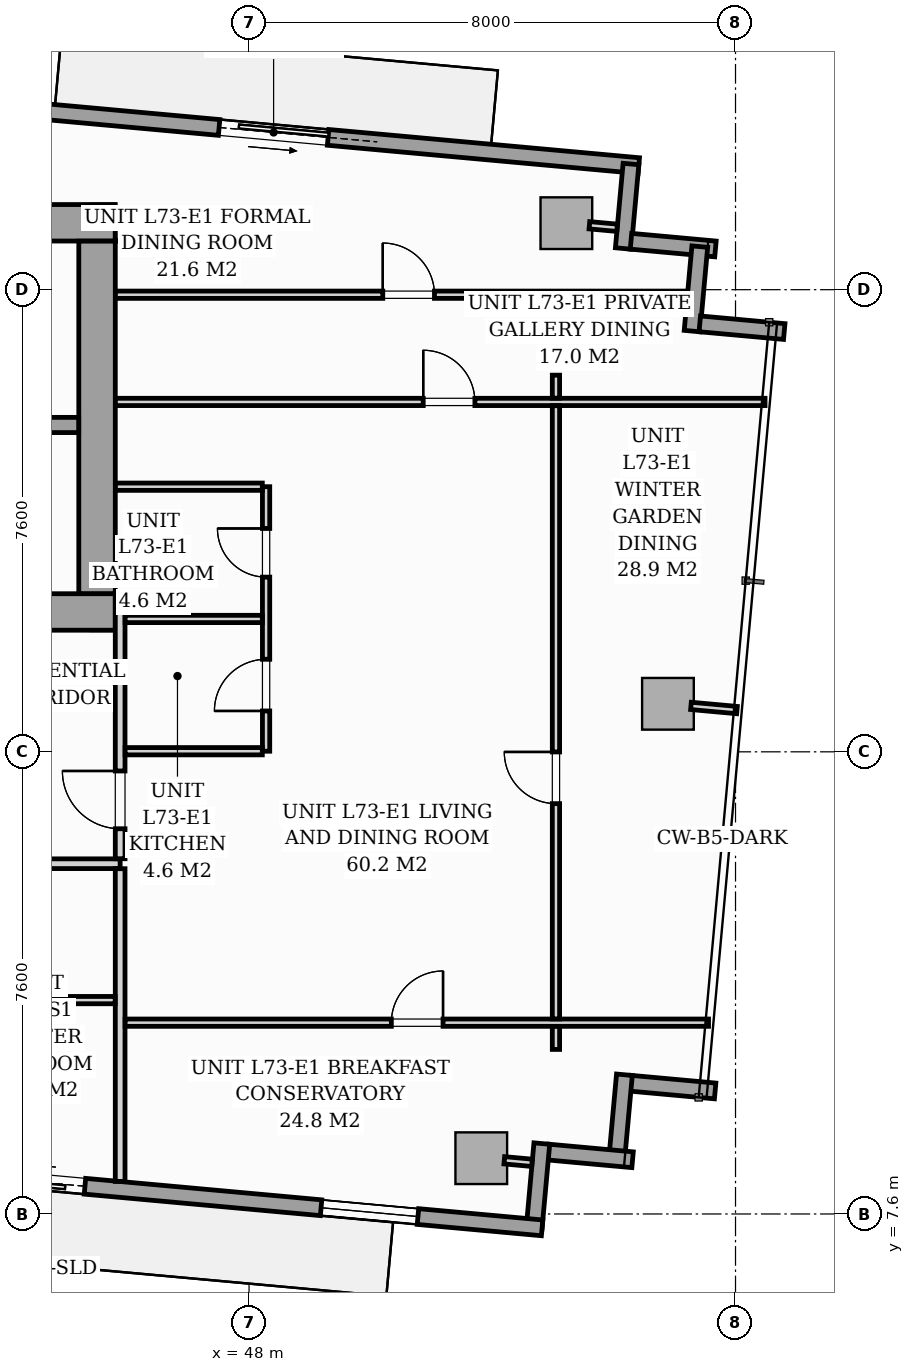
"""IFC4 building model, lengths in metres.
Left out: names, types, materials, properties, quantities, classifications, styles, units other than length and angle.
Written with IfcOpenShell. Run it as: python <this file> out.ifc"""

import sys

from ifc_helpers import new_model, si_unit, direction, frame, frame_2d, origin, origin_2d, place, context, subcontext, project, spatial, rectangle, i_section, extrude, source, transform, mapped, element, fill, save


model = new_model("IFC4")
c1 = context("Model", 3, precision=1e-05, world=origin(), true_north=direction((0.0, 1.0)))
c2 = subcontext(c1, "Body", "Model", "MODEL_VIEW")
j1 = project(units=[si_unit("LENGTHUNIT", "METRE"), si_unit("PLANEANGLEUNIT", "RADIAN")], contexts=[c1])
p1 = place(None, origin())
s1 = spatial("IfcSite", under=j1, at=p1, CompositionType="ELEMENT")
p2 = place(p1, origin())
s2 = spatial("IfcBuilding", under=s1, at=p2, CompositionType="ELEMENT")
p3 = place(p2, frame((0.0, 0.0, 252.9)))
s3 = spatial("IfcBuildingStorey", under=s2, at=p3, CompositionType="ELEMENT", Elevation=252.9)
m1 = source(origin(), c2, "Body", "SweptSolid", [
    extrude(i_section(OverallWidth=0.409, OverallDepth=0.425, WebThickness=0.033, FlangeThickness=0.052, FilletRadius=0.018, at=origin_2d()), origin(), (0.0, 0.0, 1.0), 3.296),
])
for number, where, z_axis, x_axis in (
    (1, (45.6, 17.4, 0.002), (0.0, 0.0, 1.0), (1.0, 0.0, 0.0)),
    (2, (45.6, 24.0, 0.002), (0.0, 0.0, 1.0), (1.0, 0.0, 0.0)),
):
    element("IfcColumn", number, at=place(p3, frame(where, z_axis=z_axis, x_axis=x_axis)), inside=s3, PredefinedType="PILASTER", context=c2, shape_type="MappedRepresentation", body=[
        mapped(m1, transform((0.0, 0.0, 0.0), scale=1.0)),
    ])
m2 = source(origin(), c2, "Body", "SweptSolid", [
    extrude(rectangle(XDim=0.85, YDim=0.85, at=origin_2d()), origin(), (0.0, 0.0, 1.0), 3.296),
])
for number, where, z_axis, x_axis in (
    (3, (51.819, 8.517, 0.002), (0.0, 0.0, 1.0), (0.996, -0.091, 0.0)),
    (4, (53.218, 23.894, 0.002), (0.0, 0.0, 1.0), (0.996, -0.091, 0.0)),
    (5, (54.889, 15.99, 0.002), (0.0, 0.0, 1.0), (0.996, -0.091, 0.0)),
):
    element("IfcColumn", number, at=place(p3, frame(where, z_axis=z_axis, x_axis=x_axis)), inside=s3, PredefinedType="COLUMN", context=c2, shape_type="MappedRepresentation", body=[
        mapped(m2, transform((0.0, 0.0, 0.0), scale=1.0)),
    ])
p4 = place(p3, frame((39.839, 26.166, 0.0), z_axis=(0.0, 0.0, 1.0), x_axis=(0.995884447498, -0.090632043071, 0.0)))
e6 = element("IfcWall", 6, at=p4, inside=s3, PredefinedType="STANDARD", context=c2, shape_type="SweptSolid", body=[
    extrude(rectangle(XDim=14.63, YDim=0.26, at=frame_2d((7.315, 0.0))), origin(), (0.0, 0.0, 1.0), 3.04),
])
p5 = place(p4, frame((7.7, 0.0, 0.0)))
e7 = element("IfcOpeningElement", 7, at=p5, cuts=e6, PredefinedType="OPENING", context=c2, shape_type="SweptSolid", body=[
    extrude(rectangle(XDim=1.8, YDim=2.06, at=frame_2d((0.9, 1.03))), frame((0.0, 0.14, 0.0), z_axis=(0.0, -1.0, 0.0), x_axis=(1.0, 0.0, 0.0)), (0.0, 0.0, 1.0), 0.28),
])
p6 = place(p4, frame((0.7, 0.0, 0.65)))
e8 = element("IfcOpeningElement", 8, at=p6, cuts=e6, PredefinedType="OPENING", context=c2, shape_type="SweptSolid", body=[
    extrude(rectangle(XDim=1.6, YDim=1.5, at=frame_2d((0.8, 0.75))), frame((0.0, 0.14, 0.0), z_axis=(0.0, -1.0, 0.0), x_axis=(1.0, 0.0, 0.0)), (0.0, 0.0, 1.0), 0.28),
])
p7 = place(p3, frame((54.281, 24.866, 0.0), z_axis=(0.0, 0.0, 1.0), x_axis=(-0.090661991521, -0.995881721538, 0.0)))
e9 = element("IfcWall", 9, at=p7, inside=s3, PredefinedType="STANDARD", context=c2, shape_type="SweptSolid", body=[
    extrude(rectangle(XDim=1.395, YDim=0.26, at=frame_2d((0.698, 0.0))), origin(), (0.0, 0.0, 1.0), 3.04),
])
for number, where, z_axis, x_axis in (
    (10, (54.281, 23.596, 0.0), (0.0, 0.0, 1.0), (0.996, -0.091, 0.0)),
    (11, (55.412, 23.508, 0.0), (0.0, 0.0, 1.0), (-0.091, -0.996, 0.0)),
    (12, (55.412, 22.238, 0.0), (0.0, 0.0, 1.0), (0.996, -0.091, 0.0)),
):
    element("IfcWall", number, at=place(p3, frame(where, z_axis=z_axis, x_axis=x_axis)), inside=s3, PredefinedType="STANDARD", context=c2, shape_type="SweptSolid", body=[
        extrude(rectangle(XDim=1.395, YDim=0.26, at=frame_2d((0.698, 0.0))), origin(), (0.0, 0.0, 1.0), 3.04),
    ])
for number, where, z_axis, x_axis in (
    (13, (55.665, 9.623, 0.0), (0.0, 0.0, 1.0), (-0.996, 0.091, 0.0)),
    (14, (54.173, 9.889, 0.0), (0.0, 0.0, 1.0), (-0.091, -0.996, 0.0)),
):
    element("IfcWall", number, at=place(p3, frame(where, z_axis=z_axis, x_axis=x_axis)), inside=s3, PredefinedType="STANDARD", context=c2, shape_type="SweptSolid", body=[
        extrude(rectangle(XDim=1.395, YDim=0.26, at=frame_2d((0.698, 0.0))), origin(), (0.0, 0.0, 1.0), 3.04),
    ])
for number, where, z_axis, x_axis in (
    (15, (54.307, 8.492, 0.0), (0.0, 0.0, 1.0), (-0.996, 0.091, 0.0)),
    (16, (52.815, 8.758, 0.0), (0.0, 0.0, 1.0), (-0.091, -0.996, 0.0)),
):
    element("IfcWall", number, at=place(p3, frame(where, z_axis=z_axis, x_axis=x_axis)), inside=s3, PredefinedType="STANDARD", context=c2, shape_type="SweptSolid", body=[
        extrude(rectangle(XDim=1.395, YDim=0.26, at=frame_2d((0.698, 0.0))), origin(), (0.0, 0.0, 1.0), 3.04),
    ])
p8 = place(p3, frame((52.819, 7.372, 0.0), z_axis=(0.0, 0.0, 1.0), x_axis=(-0.995884447498, 0.090632043071, 0.0)))
e17 = element("IfcWall", 17, at=p8, inside=s3, PredefinedType="STANDARD", context=c2, shape_type="SweptSolid", body=[
    extrude(rectangle(XDim=14.63, YDim=0.26, at=frame_2d((7.315, 0.0))), origin(), (0.0, 0.0, 1.0), 3.04),
])
p9 = place(p8, frame((7.549, 0.0, 0.0)))
e18 = element("IfcOpeningElement", 18, at=p9, cuts=e17, PredefinedType="OPENING", context=c2, shape_type="SweptSolid", body=[
    extrude(rectangle(XDim=1.8, YDim=2.06, at=frame_2d((0.9, 1.03))), frame((0.0, 0.14, 0.0), z_axis=(0.0, -1.0, 0.0), x_axis=(1.0, 0.0, 0.0)), (0.0, 0.0, 1.0), 0.28),
])
p10 = place(p8, frame((2.05, 0.0, 0.65)))
e19 = element("IfcOpeningElement", 19, at=p10, cuts=e17, PredefinedType="OPENING", context=c2, shape_type="SweptSolid", body=[
    extrude(rectangle(XDim=1.6, YDim=1.5, at=frame_2d((0.8, 0.75))), frame((0.0, 0.14, 0.0), z_axis=(0.0, -1.0, 0.0), x_axis=(1.0, 0.0, 0.0)), (0.0, 0.0, 1.0), 0.28),
])
p11 = place(p3, frame((26.2, 17.5, 0.0), z_axis=(0.0, 0.0, 1.0), x_axis=(1.0, 0.0, 0.0)))
e20 = element("IfcWall", 20, at=p11, inside=s3, PredefinedType="SHEAR", context=c2, shape_type="SweptSolid", body=[
    extrude(rectangle(XDim=19.6, YDim=0.6, at=frame_2d((9.8, 0.0))), origin(), (0.0, 0.0, 1.0), 3.3),
])
p12 = place(p11, frame((0.95, 0.0, 0.0)))
e21 = element("IfcOpeningElement", 21, at=p12, cuts=e20, PredefinedType="OPENING", context=c2, shape_type="SweptSolid", body=[
    extrude(rectangle(XDim=0.95, YDim=2.06, at=frame_2d((0.475, 1.03))), frame((0.0, 0.31, 0.0), z_axis=(0.0, -1.0, 0.0), x_axis=(1.0, 0.0, 0.0)), (0.0, 0.0, 1.0), 0.62),
])
p13 = place(p11, frame((9.38, 0.0, 0.0)))
e22 = element("IfcOpeningElement", 22, at=p13, cuts=e20, PredefinedType="OPENING", context=c2, shape_type="SweptSolid", body=[
    extrude(rectangle(XDim=0.85, YDim=2.0, at=frame_2d((0.425, 1.0))), frame((0.0, 0.31, 0.0), z_axis=(0.0, -1.0, 0.0), x_axis=(1.0, 0.0, 0.0)), (0.0, 0.0, 1.0), 0.62),
])
p14 = place(p11, frame((17.55, 0.0, 0.0)))
e23 = element("IfcOpeningElement", 23, at=p14, cuts=e20, PredefinedType="OPENING", context=c2, shape_type="SweptSolid", body=[
    extrude(rectangle(XDim=0.95, YDim=2.06, at=frame_2d((0.475, 1.03))), frame((0.0, 0.31, 0.0), z_axis=(0.0, -1.0, 0.0), x_axis=(1.0, 0.0, 0.0)), (0.0, 0.0, 1.0), 0.62),
])
p15 = place(p3, frame((26.2, 23.9, 0.0), z_axis=(0.0, 0.0, 1.0), x_axis=(1.0, 0.0, 0.0)))
e24 = element("IfcWall", 24, at=p15, inside=s3, PredefinedType="SHEAR", context=c2, shape_type="SweptSolid", body=[
    extrude(rectangle(XDim=19.6, YDim=0.6, at=frame_2d((9.8, 0.0))), origin(), (0.0, 0.0, 1.0), 3.3),
])
p16 = place(p3, frame((45.5, 17.802, 0.0), z_axis=(0.0, 0.0, 1.0), x_axis=(0.0, 1.0, 0.0)))
e25 = element("IfcWall", 25, at=p16, inside=s3, PredefinedType="SHEAR", context=c2, shape_type="SweptSolid", body=[
    extrude(rectangle(XDim=5.796, YDim=0.6, at=frame_2d((2.898, 0.0))), origin(), (0.0, 0.0, 1.0), 3.3),
])
p17 = place(p3, frame((37.05, 20.575, 0.0), z_axis=(0.0, 0.0, 1.0), x_axis=(1.0, 0.0, 0.0)))
e26 = element("IfcWall", 26, at=p17, inside=s3, PredefinedType="SOLIDWALL", context=c2, shape_type="SweptSolid", body=[
    extrude(rectangle(XDim=8.148, YDim=0.25, at=frame_2d((4.074, 0.0))), origin(), (0.0, 0.0, 1.0), 3.3),
])
p18 = place(p17, frame((6.6, 0.0, 0.0)))
e27 = element("IfcOpeningElement", 27, at=p18, cuts=e26, PredefinedType="OPENING", context=c2, shape_type="SweptSolid", body=[
    extrude(rectangle(XDim=0.95, YDim=2.06, at=frame_2d((0.475, 1.03))), frame((0.0, 0.135, 0.0), z_axis=(0.0, -1.0, 0.0), x_axis=(1.0, 0.0, 0.0)), (0.0, 0.0, 1.0), 0.27),
])
p19 = place(p3, frame((24.55, 13.36, 0.0), z_axis=(0.0, 0.0, 1.0), x_axis=(1.0, 0.0, 0.0)))
e28 = element("IfcWall", 28, at=p19, inside=s3, PredefinedType="PARTITIONING", context=c2, shape_type="SweptSolid", body=[
    extrude(rectangle(XDim=21.33, YDim=0.16, at=frame_2d((10.665, 0.0))), origin(), (0.0, 0.0, 1.0), 2.605),
])
p20 = place(p19, frame((5.415, 0.0, 0.0)))
e29 = element("IfcOpeningElement", 29, at=p20, cuts=e28, PredefinedType="OPENING", context=c2, shape_type="SweptSolid", body=[
    extrude(rectangle(XDim=0.95, YDim=2.06, at=frame_2d((0.475, 1.03))), frame((0.0, 0.09, 0.0), z_axis=(0.0, -1.0, 0.0), x_axis=(1.0, 0.0, 0.0)), (0.0, 0.0, 1.0), 0.18),
])
p21 = place(p3, frame((45.88, 8.136, 0.0), z_axis=(0.0, 0.0, 1.0), x_axis=(0.0, 1.0, 0.0)))
e30 = element("IfcWall", 30, at=p21, inside=s3, PredefinedType="PARTITIONING", context=c2, shape_type="SweptSolid", body=[
    extrude(rectangle(XDim=5.142, YDim=0.16, at=frame_2d((2.571, 0.0))), origin(), (0.0, 0.0, 1.0), 3.04),
])
p22 = place(p3, frame((45.88, 13.442, 0.0), z_axis=(0.0, 0.0, 1.0), x_axis=(0.0, 1.0, 0.0)))
e31 = element("IfcWall", 31, at=p22, inside=s3, PredefinedType="PARTITIONING", context=c2, shape_type="SweptSolid", body=[
    extrude(rectangle(XDim=4.36, YDim=0.16, at=frame_2d((2.18, 0.0))), origin(), (0.0, 0.0, 1.0), 3.04),
])
p23 = place(p22, frame((0.493, 0.0, 0.0)))
e32 = element("IfcOpeningElement", 32, at=p23, cuts=e31, PredefinedType="OPENING", context=c2, shape_type="SweptSolid", body=[
    extrude(rectangle(XDim=0.95, YDim=2.06, at=frame_2d((0.475, 1.03))), frame((0.0, 0.09, 0.0), z_axis=(0.0, -1.0, 0.0), x_axis=(1.0, 0.0, 0.0)), (0.0, 0.0, 1.0), 0.18),
])
p24 = place(p3, frame((45.88, 23.598, 0.0), z_axis=(0.0, 0.0, 1.0), x_axis=(0.0, 1.0, 0.0)))
e33 = element("IfcWall", 33, at=p24, inside=s3, PredefinedType="PARTITIONING", context=c2, shape_type="SweptSolid", body=[
    extrude(rectangle(XDim=0.452, YDim=0.16, at=frame_2d((0.226, 0.0))), origin(), (0.0, 0.0, 1.0), 3.04),
])
p25 = place(p3, frame((40.262, 11.117, 0.0), z_axis=(0.0, 0.0, 1.0), x_axis=(1.0, 0.0, 0.0)))
e34 = element("IfcWall", 34, at=p25, inside=s3, PredefinedType="PARTITIONING", context=c2, shape_type="SweptSolid", body=[
    extrude(rectangle(XDim=5.536, YDim=0.12, at=frame_2d((2.768, 0.0))), origin(), (0.0, 0.0, 1.0), 3.04),
])
p26 = place(p25, frame((2.528, 0.0, 0.0)))
e35 = element("IfcOpeningElement", 35, at=p26, cuts=e34, PredefinedType="OPENING", context=c2, shape_type="SweptSolid", body=[
    extrude(rectangle(XDim=0.8, YDim=2.02, at=frame_2d((0.4, 1.01))), frame((0.0, 0.07, 0.0), z_axis=(0.0, -1.0, 0.0), x_axis=(1.0, 0.0, 0.0)), (0.0, 0.0, 1.0), 0.14),
])
p27 = place(p3, frame((48.28, 15.21, 0.0), z_axis=(0.0, 0.0, 1.0), x_axis=(0.0, 1.0, 0.0)))
e36 = element("IfcWall", 36, at=p27, inside=s3, PredefinedType="PARTITIONING", context=c2, shape_type="SweptSolid", body=[
    extrude(rectangle(XDim=4.35, YDim=0.12, at=frame_2d((2.175, 0.0))), origin(), (0.0, 0.0, 1.0), 3.04),
])
p28 = place(p27, frame((0.662, 0.0, 0.0)))
e37 = element("IfcOpeningElement", 37, at=p28, cuts=e36, PredefinedType="OPENING", context=c2, shape_type="SweptSolid", body=[
    extrude(rectangle(XDim=0.85, YDim=2.05, at=frame_2d((0.425, 1.025))), frame((0.0, 0.07, 0.0), z_axis=(0.0, -1.0, 0.0), x_axis=(1.0, 0.0, 0.0)), (0.0, 0.0, 1.0), 0.14),
])
p29 = place(p27, frame((2.863, 0.0, 0.0)))
e38 = element("IfcOpeningElement", 38, at=p29, cuts=e36, PredefinedType="OPENING", context=c2, shape_type="SweptSolid", body=[
    extrude(rectangle(XDim=0.8, YDim=2.02, at=frame_2d((0.4, 1.01))), frame((0.0, 0.07, 0.0), z_axis=(0.0, -1.0, 0.0), x_axis=(1.0, 0.0, 0.0)), (0.0, 0.0, 1.0), 0.14),
])
p30 = place(p3, frame((45.962, 17.385, 0.0), z_axis=(0.0, 0.0, 1.0), x_axis=(1.0, 0.0, 0.0)))
e39 = element("IfcWall", 39, at=p30, inside=s3, PredefinedType="PARTITIONING", context=c2, shape_type="SweptSolid", body=[
    extrude(rectangle(XDim=2.256, YDim=0.12, at=frame_2d((1.128, 0.0))), origin(), (0.0, 0.0, 1.0), 2.382),
])
p31 = place(p3, frame((45.962, 15.21, 0.0), z_axis=(0.0, 0.0, 1.0), x_axis=(1.0, 0.0, 0.0)))
e40 = element("IfcWall", 40, at=p31, inside=s3, PredefinedType="PARTITIONING", context=c2, shape_type="SweptSolid", body=[
    extrude(rectangle(XDim=2.256, YDim=0.12, at=frame_2d((1.128, 0.0))), origin(), (0.0, 0.0, 1.0), 3.04),
])
p32 = place(p3, frame((45.802, 19.56, 0.0), z_axis=(0.0, 0.0, 1.0), x_axis=(1.0, 0.0, 0.0)))
e41 = element("IfcWall", 41, at=p32, inside=s3, PredefinedType="PARTITIONING", context=c2, shape_type="SweptSolid", body=[
    extrude(rectangle(XDim=2.416, YDim=0.12, at=frame_2d((1.208, 0.0))), origin(), (0.0, 0.0, 1.0), 3.04),
])
p33 = place(p3, frame((45.802, 22.717, 0.0), z_axis=(0.0, 0.0, 1.0), x_axis=(1.0, 0.0, 0.0)))
e42 = element("IfcWall", 42, at=p33, inside=s3, PredefinedType="PARTITIONING", context=c2, shape_type="SweptSolid", body=[
    extrude(rectangle(XDim=9.406, YDim=0.12, at=frame_2d((4.703, 0.0))), origin(), (0.0, 0.0, 1.0), 3.04),
])
p34 = place(p33, frame((4.397, 0.0, 0.0)))
e43 = element("IfcOpeningElement", 43, at=p34, cuts=e42, PredefinedType="OPENING", context=c2, shape_type="SweptSolid", body=[
    extrude(rectangle(XDim=0.85, YDim=2.05, at=frame_2d((0.425, 1.025))), frame((0.0, 0.07, 0.0), z_axis=(0.0, -1.0, 0.0), x_axis=(1.0, 0.0, 0.0)), (0.0, 0.0, 1.0), 0.14),
])
p35 = place(p3, frame((45.962, 10.746, 0.0), z_axis=(0.0, 0.0, 1.0), x_axis=(1.0, 0.0, 0.0)))
e44 = element("IfcWall", 44, at=p35, inside=s3, PredefinedType="PARTITIONING", context=c2, shape_type="SweptSolid", body=[
    extrude(rectangle(XDim=9.594, YDim=0.12, at=frame_2d((4.797, 0.0))), origin(), (0.0, 0.0, 1.0), 3.04),
])
p36 = place(p35, frame((4.378, 0.0, 0.0)))
e45 = element("IfcOpeningElement", 45, at=p36, cuts=e44, PredefinedType="OPENING", context=c2, shape_type="SweptSolid", body=[
    extrude(rectangle(XDim=0.85, YDim=2.05, at=frame_2d((0.425, 1.025))), frame((0.0, 0.07, 0.0), z_axis=(0.0, -1.0, 0.0), x_axis=(1.0, 0.0, 0.0)), (0.0, 0.0, 1.0), 0.14),
])
p37 = place(p3, frame((45.802, 20.954, 0.0), z_axis=(0.0, 0.0, 1.0), x_axis=(1.0, 0.0, 0.0)))
e46 = element("IfcWall", 46, at=p37, inside=s3, PredefinedType="PARTITIONING", context=c2, shape_type="SweptSolid", body=[
    extrude(rectangle(XDim=10.683, YDim=0.12, at=frame_2d((5.342, 0.0))), origin(), (0.0, 0.0, 1.0), 3.04),
])
p38 = place(p37, frame((5.062, 0.0, 0.0)))
e47 = element("IfcOpeningElement", 47, at=p38, cuts=e46, PredefinedType="OPENING", context=c2, shape_type="SweptSolid", body=[
    extrude(rectangle(XDim=0.85, YDim=2.05, at=frame_2d((0.425, 1.025))), frame((0.0, 0.07, 0.0), z_axis=(0.0, -1.0, 0.0), x_axis=(1.0, 0.0, 0.0)), (0.0, 0.0, 1.0), 0.14),
])
p39 = place(p3, frame((53.047, 10.306, 0.0), z_axis=(0.0, 0.0, 1.0), x_axis=(0.0, 1.0, 0.0)))
e48 = element("IfcWall", 48, at=p39, inside=s3, PredefinedType="PARTITIONING", context=c2, shape_type="SweptSolid", body=[
    extrude(rectangle(XDim=0.378, YDim=0.12, at=frame_2d((0.189, 0.0))), origin(), (0.0, 0.0, 1.0), 3.04),
])
p40 = place(p3, frame((53.047, 10.808, 0.0), z_axis=(0.0, 0.0, 1.0), x_axis=(0.0, 1.0, 0.0)))
e49 = element("IfcWall", 49, at=p40, inside=s3, PredefinedType="PARTITIONING", context=c2, shape_type="SweptSolid", body=[
    extrude(rectangle(XDim=10.084, YDim=0.12, at=frame_2d((5.042, 0.0))), origin(), (0.0, 0.0, 1.0), 3.04),
])
p41 = place(p40, frame((3.54, 0.0, 0.0)))
e50 = element("IfcOpeningElement", 50, at=p41, cuts=e49, PredefinedType="OPENING", context=c2, shape_type="SweptSolid", body=[
    extrude(rectangle(XDim=0.85, YDim=2.05, at=frame_2d((0.425, 1.025))), frame((0.0, 0.07, 0.0), z_axis=(0.0, -1.0, 0.0), x_axis=(1.0, 0.0, 0.0)), (0.0, 0.0, 1.0), 0.14),
])
p42 = place(p3, frame((53.047, 21.016, 0.0), z_axis=(0.0, 0.0, 1.0), x_axis=(0.0, 1.0, 0.0)))
e51 = element("IfcWall", 51, at=p42, inside=s3, PredefinedType="PARTITIONING", context=c2, shape_type="SweptSolid", body=[
    extrude(rectangle(XDim=0.378, YDim=0.12, at=frame_2d((0.189, 0.0))), origin(), (0.0, 0.0, 1.0), 3.04),
])
for number, where, z_axis, x_axis in (
    (52, (52.197, 8.483, 0.0), (0.0, 0.0, 1.0), (0.996, -0.091, 0.0)),
    (53, (53.597, 23.859, 0.0), (0.0, 0.0, 1.0), (0.996, -0.091, 0.0)),
):
    element("IfcWall", number, at=place(p3, frame(where, z_axis=z_axis, x_axis=x_axis)), inside=s3, PredefinedType="PARTITIONING", context=c2, shape_type="SweptSolid", body=[
        extrude(rectangle(XDim=0.458, YDim=0.12, at=frame_2d((0.229, 0.0))), origin(), (0.0, 0.0, 1.0), 3.04),
    ])
p43 = place(p3, frame((55.267, 15.955, 0.0), z_axis=(0.0, 0.0, 1.0), x_axis=(0.995887938321, -0.09059367697, 0.0)))
e54 = element("IfcWall", 54, at=p43, inside=s3, PredefinedType="PARTITIONING", context=c2, shape_type="SweptSolid", body=[
    extrude(rectangle(XDim=0.76, YDim=0.12, at=frame_2d((0.38, 0.0))), origin(), (0.0, 0.0, 1.0), 3.04),
])
m3 = source(origin(), c2, "Body", "SweptSolid", [
    extrude(rectangle(XDim=1.8, YDim=2.06, at=frame_2d((0.9, 1.03))), frame((0.0, 0.025, 0.0), z_axis=(0.0, -1.0, 0.0), x_axis=(1.0, 0.0, 0.0)), (0.0, 0.0, 1.0), 0.05),
])
p44 = place(p5, origin())
e55 = element("IfcDoor", 55, at=p44, inside=s3, OperationType="SLIDING_TO_RIGHT", PredefinedType="DOOR", context=c2, shape_type="MappedRepresentation", body=[
    mapped(m3, transform((0.0, 0.0, 0.0), scale=1.0)),
])
fill(e7, e55)
p45 = place(p9, origin())
e56 = element("IfcDoor", 56, at=p45, inside=s3, OperationType="SLIDING_TO_RIGHT", PredefinedType="DOOR", context=c2, shape_type="MappedRepresentation", body=[
    mapped(m3, transform((0.0, 0.0, 0.0), scale=1.0)),
])
fill(e18, e56)
m4 = source(origin(), c2, "Body", "SweptSolid", [
    extrude(rectangle(XDim=1.6, YDim=1.5, at=frame_2d((0.8, 0.75))), frame((0.0, 0.03, 0.0), z_axis=(0.0, -1.0, 0.0), x_axis=(1.0, 0.0, 0.0)), (0.0, 0.0, 1.0), 0.06),
])
p46 = place(p10, origin())
e57 = element("IfcWindow", 57, at=p46, inside=s3, PartitioningType="SINGLE_PANEL", PredefinedType="WINDOW", context=c2, shape_type="MappedRepresentation", body=[
    mapped(m4, transform((0.0, 0.0, 0.0), scale=1.0)),
])
fill(e19, e57)
m5 = source(origin(), c2, "Body", "SweptSolid", [
    extrude(rectangle(XDim=0.95, YDim=2.06, at=frame_2d((0.475, 1.03))), frame((0.0, 0.025, 0.0), z_axis=(0.0, -1.0, 0.0), x_axis=(1.0, 0.0, 0.0)), (0.0, 0.0, 1.0), 0.05),
])
p47 = place(p23, origin())
e58 = element("IfcDoor", 58, at=p47, inside=s3, OperationType="SINGLE_SWING_RIGHT", PredefinedType="DOOR", context=c2, shape_type="MappedRepresentation", body=[
    mapped(m5, transform((0.0, 0.0, 0.0), scale=1.0)),
])
fill(e32, e58)
m6 = source(origin(), c2, "Body", "SweptSolid", [
    extrude(rectangle(XDim=0.85, YDim=2.05, at=frame_2d((0.425, 1.025))), frame((0.0, 0.025, 0.0), z_axis=(0.0, -1.0, 0.0), x_axis=(1.0, 0.0, 0.0)), (0.0, 0.0, 1.0), 0.05),
])
p48 = place(p28, origin())
e59 = element("IfcDoor", 59, at=p48, inside=s3, OperationType="SINGLE_SWING_LEFT", PredefinedType="DOOR", context=c2, shape_type="MappedRepresentation", body=[
    mapped(m6, transform((0.0, 0.0, 0.0), scale=1.0)),
])
fill(e37, e59)
m7 = source(origin(), c2, "Body", "SweptSolid", [
    extrude(rectangle(XDim=0.8, YDim=2.02, at=frame_2d((0.4, 1.01))), frame((0.0, 0.025, 0.0), z_axis=(0.0, -1.0, 0.0), x_axis=(1.0, 0.0, 0.0)), (0.0, 0.0, 1.0), 0.05),
])
p49 = place(p29, origin())
e60 = element("IfcDoor", 60, at=p49, inside=s3, OperationType="SINGLE_SWING_RIGHT", PredefinedType="DOOR", context=c2, shape_type="MappedRepresentation", body=[
    mapped(m7, transform((0.0, 0.0, 0.0), scale=1.0)),
])
fill(e38, e60)
p50 = place(p34, origin())
e61 = element("IfcDoor", 61, at=p50, inside=s3, OperationType="SINGLE_SWING_LEFT", PredefinedType="DOOR", context=c2, shape_type="MappedRepresentation", body=[
    mapped(m6, transform((0.0, 0.0, 0.0), scale=1.0)),
])
fill(e43, e61)
p51 = place(p36, origin())
e62 = element("IfcDoor", 62, at=p51, inside=s3, OperationType="SINGLE_SWING_RIGHT", PredefinedType="DOOR", context=c2, shape_type="MappedRepresentation", body=[
    mapped(m6, transform((0.0, 0.0, 0.0), scale=1.0)),
])
fill(e45, e62)
p52 = place(p38, origin())
e63 = element("IfcDoor", 63, at=p52, inside=s3, OperationType="SINGLE_SWING_LEFT", PredefinedType="DOOR", context=c2, shape_type="MappedRepresentation", body=[
    mapped(m6, transform((0.0, 0.0, 0.0), scale=1.0)),
])
fill(e47, e63)
p53 = place(p41, origin())
e64 = element("IfcDoor", 64, at=p53, inside=s3, OperationType="SINGLE_SWING_RIGHT", PredefinedType="DOOR", context=c2, shape_type="MappedRepresentation", body=[
    mapped(m6, transform((0.0, 0.0, 0.0), scale=1.0)),
])
fill(e50, e64)
save(model, sys.argv[1])
